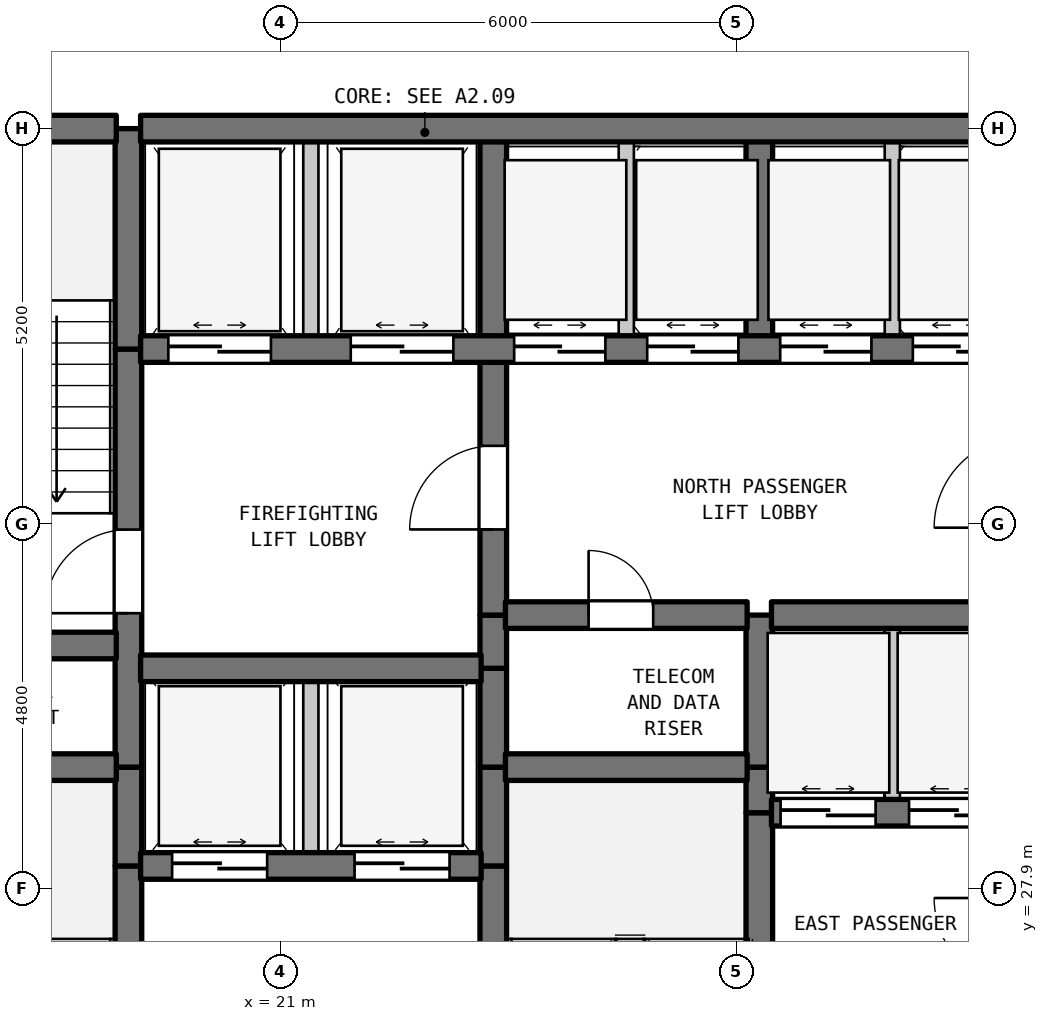
"""IFC4 building model, lengths in metres.
Left out: names, types, materials, properties, quantities, classifications, styles, units other than length and angle.
Written with IfcOpenShell. Run it as: python <this file> out.ifc"""

import sys

from ifc_helpers import new_model, si_unit, direction, frame, frame_2d, origin, place, context, subcontext, project, spatial, rectangle, extrude, element, fill, save


model = new_model("IFC4")
c1 = context("Model", 3, precision=1e-05, world=origin(), true_north=direction((0.0, 1.0)))
c2 = subcontext(c1, "Body", "Model", "MODEL_VIEW")
j1 = project(units=[si_unit("LENGTHUNIT", "METRE"), si_unit("PLANEANGLEUNIT", "RADIAN")], contexts=[c1])
p1 = place(None, origin())
s1 = spatial("IfcSite", under=j1, at=p1, CompositionType="ELEMENT")
p2 = place(p1, origin())
s2 = spatial("IfcBuilding", under=s1, at=p2, CompositionType="ELEMENT")
p3 = place(p2, frame((0.0, 0.0, 98.3)))
s3 = spatial("IfcBuildingStorey", under=s2, at=p3, CompositionType="ELEMENT", Elevation=98.3)
p4 = place(p3, frame((19.0, 22.7, 0.0), z_axis=(0.0, 0.0, 1.0), x_axis=(0.0, 1.0, 0.0)))
e1 = element("IfcWall", 1, at=p4, inside=s3, PredefinedType="SHEAR", context=c2, shape_type="SweptSolid", body=[
    extrude(rectangle(XDim=5.5, YDim=0.35, at=frame_2d((2.75, 0.0))), origin(), (0.0, 0.0, 1.0), 3.385),
])
p5 = place(p4, frame((0.631, 0.0, 0.0)))
e2 = element("IfcOpeningElement", 2, at=p5, cuts=e1, PredefinedType="OPENING", context=c2, shape_type="SweptSolid", body=[
    extrude(rectangle(XDim=1.1, YDim=2.15, at=frame_2d((0.55, 1.075))), frame((0.0, 0.185, 0.0), z_axis=(0.0, -1.0, 0.0), x_axis=(1.0, 0.0, 0.0)), (0.0, 0.0, 1.0), 0.37),
])
p6 = place(p3, frame((19.0, 28.2, 0.0), z_axis=(0.0, 0.0, 1.0), x_axis=(0.0, 1.0, 0.0)))
e3 = element("IfcWall", 3, at=p6, inside=s3, PredefinedType="SHEAR", context=c2, shape_type="SweptSolid", body=[
    extrude(rectangle(XDim=1.3, YDim=0.35, at=frame_2d((0.65, 0.0))), origin(), (0.0, 0.0, 1.0), 3.385),
])
p7 = place(p3, frame((19.0, 29.5, 0.0), z_axis=(0.0, 0.0, 1.0), x_axis=(0.0, 1.0, 0.0)))
e4 = element("IfcWall", 4, at=p7, inside=s3, PredefinedType="SHEAR", context=c2, shape_type="SweptSolid", body=[
    extrude(rectangle(XDim=5.5, YDim=0.35, at=frame_2d((2.75, 0.0))), origin(), (0.0, 0.0, 1.0), 3.385),
])
p8 = place(p7, frame((2.025, 0.0, 0.0)))
e5 = element("IfcOpeningElement", 5, at=p8, cuts=e4, PredefinedType="OPENING", context=c2, shape_type="SweptSolid", body=[
    extrude(rectangle(XDim=1.1, YDim=2.15, at=frame_2d((0.55, 1.075))), frame((0.0, 0.185, 0.0), z_axis=(0.0, -1.0, 0.0), x_axis=(1.0, 0.0, 0.0)), (0.0, 0.0, 1.0), 0.37),
])
p9 = place(p3, frame((19.0, 35.0, 0.0), z_axis=(0.0, 0.0, 1.0), x_axis=(0.0, 1.0, 0.0)))
e6 = element("IfcWall", 6, at=p9, inside=s3, PredefinedType="SHEAR", context=c2, shape_type="SweptSolid", body=[
    extrude(rectangle(XDim=2.9, YDim=0.35, at=frame_2d((1.45, 0.0))), origin(), (0.0, 0.0, 1.0), 3.385),
])
p10 = place(p3, frame((21.4, 28.2, 0.0), z_axis=(0.0, 0.0, 1.0), x_axis=(0.0, 1.0, 0.0)))
e7 = element("IfcWall", 7, at=p10, inside=s3, PredefinedType="STANDARD", context=c2, shape_type="SweptSolid", body=[
    extrude(rectangle(XDim=2.6, YDim=0.2, at=frame_2d((1.3, 0.0))), origin(), (0.0, 0.0, 1.0), 3.385),
])
p11 = place(p3, frame((21.4, 35.0, 0.0), z_axis=(0.0, 0.0, 1.0), x_axis=(0.0, 1.0, 0.0)))
e8 = element("IfcWall", 8, at=p11, inside=s3, PredefinedType="STANDARD", context=c2, shape_type="SweptSolid", body=[
    extrude(rectangle(XDim=2.9, YDim=0.2, at=frame_2d((1.45, 0.0))), origin(), (0.0, 0.0, 1.0), 3.385),
])
p12 = place(p3, frame((23.8, 22.7, 0.0), z_axis=(0.0, 0.0, 1.0), x_axis=(0.0, 1.0, 0.0)))
e9 = element("IfcWall", 9, at=p12, inside=s3, PredefinedType="SHEAR", context=c2, shape_type="SweptSolid", body=[
    extrude(rectangle(XDim=5.5, YDim=0.35, at=frame_2d((2.75, 0.0))), origin(), (0.0, 0.0, 1.0), 3.385),
])
p13 = place(p12, frame((0.235, 0.0, 0.0)))
e10 = element("IfcOpeningElement", 10, at=p13, cuts=e9, PredefinedType="OPENING", context=c2, shape_type="SweptSolid", body=[
    extrude(rectangle(XDim=1.1, YDim=2.15, at=frame_2d((0.55, 1.075))), frame((0.0, 0.185, 0.0), z_axis=(0.0, -1.0, 0.0), x_axis=(1.0, 0.0, 0.0)), (0.0, 0.0, 1.0), 0.37),
])
for number, where, z_axis, x_axis in (
    (11, (23.8, 28.2, 0.0), (0.0, 0.0, 1.0), (0.0, 1.0, 0.0)),
    (12, (23.8, 29.5, 0.0), (0.0, 0.0, 1.0), (0.0, 1.0, 0.0)),
):
    element("IfcWall", number, at=place(p3, frame(where, z_axis=z_axis, x_axis=x_axis)), inside=s3, PredefinedType="SHEAR", context=c2, shape_type="SweptSolid", body=[
        extrude(rectangle(XDim=1.3, YDim=0.35, at=frame_2d((0.65, 0.0))), origin(), (0.0, 0.0, 1.0), 3.385),
    ])
p14 = place(p3, frame((23.8, 30.8, 0.0), z_axis=(0.0, 0.0, 1.0), x_axis=(0.0, 1.0, 0.0)))
e13 = element("IfcWall", 13, at=p14, inside=s3, PredefinedType="SHEAR", context=c2, shape_type="SweptSolid", body=[
    extrude(rectangle(XDim=0.7, YDim=0.35, at=frame_2d((0.35, 0.0))), origin(), (0.0, 0.0, 1.0), 3.385),
])
p15 = place(p3, frame((23.8, 31.5, 0.0), z_axis=(0.0, 0.0, 1.0), x_axis=(0.0, 1.0, 0.0)))
e14 = element("IfcWall", 14, at=p15, inside=s3, PredefinedType="SHEAR", context=c2, shape_type="SweptSolid", body=[
    extrude(rectangle(XDim=3.5, YDim=0.35, at=frame_2d((1.75, 0.0))), origin(), (0.0, 0.0, 1.0), 3.385),
])
p16 = place(p15, frame((1.127, 0.0, 0.0)))
e15 = element("IfcOpeningElement", 15, at=p16, cuts=e14, PredefinedType="OPENING", context=c2, shape_type="SweptSolid", body=[
    extrude(rectangle(XDim=1.1, YDim=2.15, at=frame_2d((0.55, 1.075))), frame((0.0, 0.185, 0.0), z_axis=(0.0, -1.0, 0.0), x_axis=(1.0, 0.0, 0.0)), (0.0, 0.0, 1.0), 0.37),
])
p17 = place(p3, frame((23.8, 35.0, 0.0), z_axis=(0.0, 0.0, 1.0), x_axis=(0.0, 1.0, 0.0)))
e16 = element("IfcWall", 16, at=p17, inside=s3, PredefinedType="SHEAR", context=c2, shape_type="SweptSolid", body=[
    extrude(rectangle(XDim=2.9, YDim=0.35, at=frame_2d((1.45, 0.0))), origin(), (0.0, 0.0, 1.0), 3.385),
])
p18 = place(p3, frame((25.55, 35.0, 0.0), z_axis=(0.0, 0.0, 1.0), x_axis=(0.0, 1.0, 0.0)))
e17 = element("IfcWall", 17, at=p18, inside=s3, PredefinedType="STANDARD", context=c2, shape_type="SweptSolid", body=[
    extrude(rectangle(XDim=2.9, YDim=0.2, at=frame_2d((1.45, 0.0))), origin(), (0.0, 0.0, 1.0), 3.385),
])
p19 = place(p3, frame((27.3, 25.6, 0.0), z_axis=(0.0, 0.0, 1.0), x_axis=(0.0, 1.0, 0.0)))
e18 = element("IfcWall", 18, at=p19, inside=s3, PredefinedType="SHEAR", context=c2, shape_type="SweptSolid", body=[
    extrude(rectangle(XDim=3.3, YDim=0.35, at=frame_2d((1.65, 0.0))), origin(), (0.0, 0.0, 1.0), 3.385),
])
p20 = place(p3, frame((27.3, 28.9, 0.0), z_axis=(0.0, 0.0, 1.0), x_axis=(0.0, 1.0, 0.0)))
e19 = element("IfcWall", 19, at=p20, inside=s3, PredefinedType="SHEAR", context=c2, shape_type="SweptSolid", body=[
    extrude(rectangle(XDim=0.6, YDim=0.35, at=frame_2d((0.3, 0.0))), origin(), (0.0, 0.0, 1.0), 3.385),
])
p21 = place(p3, frame((27.3, 29.5, 0.0), z_axis=(0.0, 0.0, 1.0), x_axis=(0.0, 1.0, 0.0)))
e20 = element("IfcWall", 20, at=p21, inside=s3, PredefinedType="SHEAR", context=c2, shape_type="SweptSolid", body=[
    extrude(rectangle(XDim=2.0, YDim=0.35, at=frame_2d((1.0, 0.0))), origin(), (0.0, 0.0, 1.0), 3.385),
])
p22 = place(p3, frame((27.3, 35.0, 0.0), z_axis=(0.0, 0.0, 1.0), x_axis=(0.0, 1.0, 0.0)))
e21 = element("IfcWall", 21, at=p22, inside=s3, PredefinedType="SHEAR", context=c2, shape_type="SweptSolid", body=[
    extrude(rectangle(XDim=2.9, YDim=0.35, at=frame_2d((1.45, 0.0))), origin(), (0.0, 0.0, 1.0), 3.385),
])
p23 = place(p3, frame((29.05, 28.9, 0.0), z_axis=(0.0, 0.0, 1.0), x_axis=(0.0, 1.0, 0.0)))
e22 = element("IfcWall", 22, at=p23, inside=s3, PredefinedType="STANDARD", context=c2, shape_type="SweptSolid", body=[
    extrude(rectangle(XDim=2.6, YDim=0.2, at=frame_2d((1.3, 0.0))), origin(), (0.0, 0.0, 1.0), 3.385),
])
p24 = place(p3, frame((29.05, 35.0, 0.0), z_axis=(0.0, 0.0, 1.0), x_axis=(0.0, 1.0, 0.0)))
e23 = element("IfcWall", 23, at=p24, inside=s3, PredefinedType="STANDARD", context=c2, shape_type="SweptSolid", body=[
    extrude(rectangle(XDim=2.9, YDim=0.2, at=frame_2d((1.45, 0.0))), origin(), (0.0, 0.0, 1.0), 3.385),
])
p25 = place(p3, frame((19.16, 28.2, 0.0), z_axis=(0.0, 0.0, 1.0), x_axis=(1.0, 0.0, 0.0)))
e24 = element("IfcWall", 24, at=p25, inside=s3, PredefinedType="SHEAR", context=c2, shape_type="SweptSolid", body=[
    extrude(rectangle(XDim=4.48, YDim=0.35, at=frame_2d((2.24, 0.0))), origin(), (0.0, 0.0, 1.0), 3.385),
])
p26 = place(p25, frame((0.415, 0.0, 0.0)))
e25 = element("IfcOpeningElement", 25, at=p26, cuts=e24, PredefinedType="OPENING", context=c2, shape_type="SweptSolid", body=[
    extrude(rectangle(XDim=1.25, YDim=2.2, at=frame_2d((0.625, 1.1))), frame((0.0, 0.185, 0.0), z_axis=(0.0, -1.0, 0.0), x_axis=(1.0, 0.0, 0.0)), (0.0, 0.0, 1.0), 0.37),
])
p27 = place(p25, frame((2.815, 0.0, 0.0)))
e26 = element("IfcOpeningElement", 26, at=p27, cuts=e24, PredefinedType="OPENING", context=c2, shape_type="SweptSolid", body=[
    extrude(rectangle(XDim=1.25, YDim=2.2, at=frame_2d((0.625, 1.1))), frame((0.0, 0.185, 0.0), z_axis=(0.0, -1.0, 0.0), x_axis=(1.0, 0.0, 0.0)), (0.0, 0.0, 1.0), 0.37),
])
p28 = place(p3, frame((27.46, 28.9, 0.0), z_axis=(0.0, 0.0, 1.0), x_axis=(1.0, 0.0, 0.0)))
e27 = element("IfcWall", 27, at=p28, inside=s3, PredefinedType="SHEAR", context=c2, shape_type="SweptSolid", body=[
    extrude(rectangle(XDim=3.18, YDim=0.35, at=frame_2d((1.59, 0.0))), origin(), (0.0, 0.0, 1.0), 3.385),
])
p29 = place(p28, frame((0.12, 0.0, 0.0)))
e28 = element("IfcOpeningElement", 28, at=p29, cuts=e27, PredefinedType="OPENING", context=c2, shape_type="SweptSolid", body=[
    extrude(rectangle(XDim=1.25, YDim=2.2, at=frame_2d((0.625, 1.1))), frame((0.0, 0.185, 0.0), z_axis=(0.0, -1.0, 0.0), x_axis=(1.0, 0.0, 0.0)), (0.0, 0.0, 1.0), 0.37),
])
p30 = place(p28, frame((1.81, 0.0, 0.0)))
e29 = element("IfcOpeningElement", 29, at=p30, cuts=e27, PredefinedType="OPENING", context=c2, shape_type="SweptSolid", body=[
    extrude(rectangle(XDim=1.25, YDim=2.2, at=frame_2d((0.625, 1.1))), frame((0.0, 0.185, 0.0), z_axis=(0.0, -1.0, 0.0), x_axis=(1.0, 0.0, 0.0)), (0.0, 0.0, 1.0), 0.37),
])
p31 = place(p3, frame((15.16, 29.5, 0.0), z_axis=(0.0, 0.0, 1.0), x_axis=(1.0, 0.0, 0.0)))
e30 = element("IfcWall", 30, at=p31, inside=s3, PredefinedType="SHEAR", context=c2, shape_type="SweptSolid", body=[
    extrude(rectangle(XDim=3.68, YDim=0.35, at=frame_2d((1.84, 0.0))), origin(), (0.0, 0.0, 1.0), 3.385),
])
p32 = place(p3, frame((23.96, 29.5, 0.0), z_axis=(0.0, 0.0, 1.0), x_axis=(1.0, 0.0, 0.0)))
e31 = element("IfcWall", 31, at=p32, inside=s3, PredefinedType="SHEAR", context=c2, shape_type="SweptSolid", body=[
    extrude(rectangle(XDim=3.18, YDim=0.35, at=frame_2d((1.59, 0.0))), origin(), (0.0, 0.0, 1.0), 3.385),
])
p33 = place(p3, frame((19.16, 30.8, 0.0), z_axis=(0.0, 0.0, 1.0), x_axis=(1.0, 0.0, 0.0)))
e32 = element("IfcWall", 32, at=p33, inside=s3, PredefinedType="SHEAR", context=c2, shape_type="SweptSolid", body=[
    extrude(rectangle(XDim=4.48, YDim=0.35, at=frame_2d((2.24, 0.0))), origin(), (0.0, 0.0, 1.0), 3.385),
])
p34 = place(p3, frame((15.16, 31.1, 0.0), z_axis=(0.0, 0.0, 1.0), x_axis=(1.0, 0.0, 0.0)))
e33 = element("IfcWall", 33, at=p34, inside=s3, PredefinedType="SHEAR", context=c2, shape_type="SweptSolid", body=[
    extrude(rectangle(XDim=3.68, YDim=0.35, at=frame_2d((1.84, 0.0))), origin(), (0.0, 0.0, 1.0), 3.385),
])
p35 = place(p3, frame((23.96, 31.5, 0.0), z_axis=(0.0, 0.0, 1.0), x_axis=(1.0, 0.0, 0.0)))
e34 = element("IfcWall", 34, at=p35, inside=s3, PredefinedType="SHEAR", context=c2, shape_type="SweptSolid", body=[
    extrude(rectangle(XDim=3.18, YDim=0.35, at=frame_2d((1.59, 0.0))), origin(), (0.0, 0.0, 1.0), 3.385),
])
p36 = place(p35, frame((1.094, 0.0, 0.0)))
e35 = element("IfcOpeningElement", 35, at=p36, cuts=e34, PredefinedType="OPENING", context=c2, shape_type="SweptSolid", body=[
    extrude(rectangle(XDim=0.85, YDim=2.1, at=frame_2d((0.425, 1.05))), frame((0.0, 0.185, 0.0), z_axis=(0.0, -1.0, 0.0), x_axis=(1.0, 0.0, 0.0)), (0.0, 0.0, 1.0), 0.37),
])
p37 = place(p3, frame((27.46, 31.5, 0.0), z_axis=(0.0, 0.0, 1.0), x_axis=(1.0, 0.0, 0.0)))
e36 = element("IfcWall", 36, at=p37, inside=s3, PredefinedType="SHEAR", context=c2, shape_type="SweptSolid", body=[
    extrude(rectangle(XDim=3.18, YDim=0.35, at=frame_2d((1.59, 0.0))), origin(), (0.0, 0.0, 1.0), 3.385),
])
p38 = place(p3, frame((19.16, 35.0, 0.0), z_axis=(0.0, 0.0, 1.0), x_axis=(1.0, 0.0, 0.0)))
e37 = element("IfcWall", 37, at=p38, inside=s3, PredefinedType="SHEAR", context=c2, shape_type="SweptSolid", body=[
    extrude(rectangle(XDim=11.48, YDim=0.35, at=frame_2d((5.74, 0.0))), origin(), (0.0, 0.0, 1.0), 3.385),
])
p39 = place(p38, frame((0.365, 0.0, 0.0)))
e38 = element("IfcOpeningElement", 38, at=p39, cuts=e37, PredefinedType="OPENING", context=c2, shape_type="SweptSolid", body=[
    extrude(rectangle(XDim=1.35, YDim=2.2, at=frame_2d((0.675, 1.1))), frame((0.0, 0.185, 0.0), z_axis=(0.0, -1.0, 0.0), x_axis=(1.0, 0.0, 0.0)), (0.0, 0.0, 1.0), 0.37),
])
p40 = place(p38, frame((2.765, 0.0, 0.0)))
e39 = element("IfcOpeningElement", 39, at=p40, cuts=e37, PredefinedType="OPENING", context=c2, shape_type="SweptSolid", body=[
    extrude(rectangle(XDim=1.35, YDim=2.2, at=frame_2d((0.675, 1.1))), frame((0.0, 0.185, 0.0), z_axis=(0.0, -1.0, 0.0), x_axis=(1.0, 0.0, 0.0)), (0.0, 0.0, 1.0), 0.37),
])
p41 = place(p38, frame((4.915, 0.0, 0.0)))
e40 = element("IfcOpeningElement", 40, at=p41, cuts=e37, PredefinedType="OPENING", context=c2, shape_type="SweptSolid", body=[
    extrude(rectangle(XDim=1.2, YDim=2.2, at=frame_2d((0.6, 1.1))), frame((0.0, 0.185, 0.0), z_axis=(0.0, -1.0, 0.0), x_axis=(1.0, 0.0, 0.0)), (0.0, 0.0, 1.0), 0.37),
])
p42 = place(p38, frame((6.665, 0.0, 0.0)))
e41 = element("IfcOpeningElement", 41, at=p42, cuts=e37, PredefinedType="OPENING", context=c2, shape_type="SweptSolid", body=[
    extrude(rectangle(XDim=1.2, YDim=2.2, at=frame_2d((0.6, 1.1))), frame((0.0, 0.185, 0.0), z_axis=(0.0, -1.0, 0.0), x_axis=(1.0, 0.0, 0.0)), (0.0, 0.0, 1.0), 0.37),
])
p43 = place(p38, frame((8.415, 0.0, 0.0)))
e42 = element("IfcOpeningElement", 42, at=p43, cuts=e37, PredefinedType="OPENING", context=c2, shape_type="SweptSolid", body=[
    extrude(rectangle(XDim=1.2, YDim=2.2, at=frame_2d((0.6, 1.1))), frame((0.0, 0.185, 0.0), z_axis=(0.0, -1.0, 0.0), x_axis=(1.0, 0.0, 0.0)), (0.0, 0.0, 1.0), 0.37),
])
p44 = place(p38, frame((10.16, 0.0, 0.0)))
e43 = element("IfcOpeningElement", 43, at=p44, cuts=e37, PredefinedType="OPENING", context=c2, shape_type="SweptSolid", body=[
    extrude(rectangle(XDim=1.2, YDim=2.2, at=frame_2d((0.6, 1.1))), frame((0.0, 0.185, 0.0), z_axis=(0.0, -1.0, 0.0), x_axis=(1.0, 0.0, 0.0)), (0.0, 0.0, 1.0), 0.37),
])
p45 = place(p3, frame((15.16, 37.9, 0.0), z_axis=(0.0, 0.0, 1.0), x_axis=(1.0, 0.0, 0.0)))
e44 = element("IfcWall", 44, at=p45, inside=s3, PredefinedType="SHEAR", context=c2, shape_type="SweptSolid", body=[
    extrude(rectangle(XDim=3.68, YDim=0.35, at=frame_2d((1.84, 0.0))), origin(), (0.0, 0.0, 1.0), 3.385),
])
p46 = place(p3, frame((19.16, 37.9, 0.0), z_axis=(0.0, 0.0, 1.0), x_axis=(1.0, 0.0, 0.0)))
e45 = element("IfcWall", 45, at=p46, inside=s3, PredefinedType="SHEAR", context=c2, shape_type="SweptSolid", body=[
    extrude(rectangle(XDim=11.48, YDim=0.35, at=frame_2d((5.74, 0.0))), origin(), (0.0, 0.0, 1.0), 3.385),
])
p47 = place(p8, origin())
e46 = element("IfcDoor", 46, at=p47, inside=s3, OperationType="SINGLE_SWING_LEFT", PredefinedType="DOOR", context=c2, shape_type="SweptSolid", body=[
    extrude(rectangle(XDim=1.1, YDim=2.15, at=frame_2d((0.55, 1.075))), frame((0.0, 0.025, 0.0), z_axis=(0.0, -1.0, 0.0), x_axis=(1.0, 0.0, 0.0)), (0.0, 0.0, 1.0), 0.05),
])
fill(e5, e46)
p48 = place(p16, origin())
e47 = element("IfcDoor", 47, at=p48, inside=s3, OperationType="SINGLE_SWING_LEFT", PredefinedType="DOOR", context=c2, shape_type="SweptSolid", body=[
    extrude(rectangle(XDim=1.1, YDim=2.15, at=frame_2d((0.55, 1.075))), frame((0.0, 0.025, 0.0), z_axis=(0.0, -1.0, 0.0), x_axis=(1.0, 0.0, 0.0)), (0.0, 0.0, 1.0), 0.05),
])
fill(e15, e47)
p49 = place(p26, origin())
e48 = element("IfcDoor", 48, at=p49, inside=s3, OperationType="DOUBLE_DOOR_SLIDING", PredefinedType="DOOR", context=c2, shape_type="SweptSolid", body=[
    extrude(rectangle(XDim=1.25, YDim=2.2, at=frame_2d((0.625, 1.1))), frame((0.0, 0.025, 0.0), z_axis=(0.0, -1.0, 0.0), x_axis=(1.0, 0.0, 0.0)), (0.0, 0.0, 1.0), 0.05),
])
fill(e25, e48)
p50 = place(p27, origin())
e49 = element("IfcDoor", 49, at=p50, inside=s3, OperationType="DOUBLE_DOOR_SLIDING", PredefinedType="DOOR", context=c2, shape_type="SweptSolid", body=[
    extrude(rectangle(XDim=1.25, YDim=2.2, at=frame_2d((0.625, 1.1))), frame((0.0, 0.025, 0.0), z_axis=(0.0, -1.0, 0.0), x_axis=(1.0, 0.0, 0.0)), (0.0, 0.0, 1.0), 0.05),
])
fill(e26, e49)
p51 = place(p29, origin())
e50 = element("IfcDoor", 50, at=p51, inside=s3, OperationType="DOUBLE_DOOR_SLIDING", PredefinedType="DOOR", context=c2, shape_type="SweptSolid", body=[
    extrude(rectangle(XDim=1.25, YDim=2.2, at=frame_2d((0.625, 1.1))), frame((0.0, 0.025, 0.0), z_axis=(0.0, -1.0, 0.0), x_axis=(1.0, 0.0, 0.0)), (0.0, 0.0, 1.0), 0.05),
])
fill(e28, e50)
p52 = place(p30, origin())
e51 = element("IfcDoor", 51, at=p52, inside=s3, OperationType="DOUBLE_DOOR_SLIDING", PredefinedType="DOOR", context=c2, shape_type="SweptSolid", body=[
    extrude(rectangle(XDim=1.25, YDim=2.2, at=frame_2d((0.625, 1.1))), frame((0.0, 0.025, 0.0), z_axis=(0.0, -1.0, 0.0), x_axis=(1.0, 0.0, 0.0)), (0.0, 0.0, 1.0), 0.05),
])
fill(e29, e51)
p53 = place(p36, origin())
e52 = element("IfcDoor", 52, at=p53, inside=s3, OperationType="SINGLE_SWING_LEFT", PredefinedType="DOOR", context=c2, shape_type="SweptSolid", body=[
    extrude(rectangle(XDim=0.85, YDim=2.1, at=frame_2d((0.425, 1.05))), frame((0.0, 0.025, 0.0), z_axis=(0.0, -1.0, 0.0), x_axis=(1.0, 0.0, 0.0)), (0.0, 0.0, 1.0), 0.05),
])
fill(e35, e52)
p54 = place(p39, origin())
e53 = element("IfcDoor", 53, at=p54, inside=s3, OperationType="DOUBLE_DOOR_SLIDING", PredefinedType="DOOR", context=c2, shape_type="SweptSolid", body=[
    extrude(rectangle(XDim=1.35, YDim=2.2, at=frame_2d((0.675, 1.1))), frame((0.0, 0.025, 0.0), z_axis=(0.0, -1.0, 0.0), x_axis=(1.0, 0.0, 0.0)), (0.0, 0.0, 1.0), 0.05),
])
fill(e38, e53)
p55 = place(p40, origin())
e54 = element("IfcDoor", 54, at=p55, inside=s3, OperationType="DOUBLE_DOOR_SLIDING", PredefinedType="DOOR", context=c2, shape_type="SweptSolid", body=[
    extrude(rectangle(XDim=1.35, YDim=2.2, at=frame_2d((0.675, 1.1))), frame((0.0, 0.025, 0.0), z_axis=(0.0, -1.0, 0.0), x_axis=(1.0, 0.0, 0.0)), (0.0, 0.0, 1.0), 0.05),
])
fill(e39, e54)
p56 = place(p41, origin())
e55 = element("IfcDoor", 55, at=p56, inside=s3, OperationType="DOUBLE_DOOR_SLIDING", PredefinedType="DOOR", context=c2, shape_type="SweptSolid", body=[
    extrude(rectangle(XDim=1.2, YDim=2.2, at=frame_2d((0.6, 1.1))), frame((0.0, 0.025, 0.0), z_axis=(0.0, -1.0, 0.0), x_axis=(1.0, 0.0, 0.0)), (0.0, 0.0, 1.0), 0.05),
])
fill(e40, e55)
p57 = place(p42, origin())
e56 = element("IfcDoor", 56, at=p57, inside=s3, OperationType="DOUBLE_DOOR_SLIDING", PredefinedType="DOOR", context=c2, shape_type="SweptSolid", body=[
    extrude(rectangle(XDim=1.2, YDim=2.2, at=frame_2d((0.6, 1.1))), frame((0.0, 0.025, 0.0), z_axis=(0.0, -1.0, 0.0), x_axis=(1.0, 0.0, 0.0)), (0.0, 0.0, 1.0), 0.05),
])
fill(e41, e56)
p58 = place(p43, origin())
e57 = element("IfcDoor", 57, at=p58, inside=s3, OperationType="DOUBLE_DOOR_SLIDING", PredefinedType="DOOR", context=c2, shape_type="SweptSolid", body=[
    extrude(rectangle(XDim=1.2, YDim=2.2, at=frame_2d((0.6, 1.1))), frame((0.0, 0.025, 0.0), z_axis=(0.0, -1.0, 0.0), x_axis=(1.0, 0.0, 0.0)), (0.0, 0.0, 1.0), 0.05),
])
fill(e42, e57)
p59 = place(p44, origin())
e58 = element("IfcDoor", 58, at=p59, inside=s3, OperationType="DOUBLE_DOOR_SLIDING", PredefinedType="DOOR", context=c2, shape_type="SweptSolid", body=[
    extrude(rectangle(XDim=1.2, YDim=2.2, at=frame_2d((0.6, 1.1))), frame((0.0, 0.025, 0.0), z_axis=(0.0, -1.0, 0.0), x_axis=(1.0, 0.0, 0.0)), (0.0, 0.0, 1.0), 0.05),
])
fill(e43, e58)
save(model, sys.argv[1])
